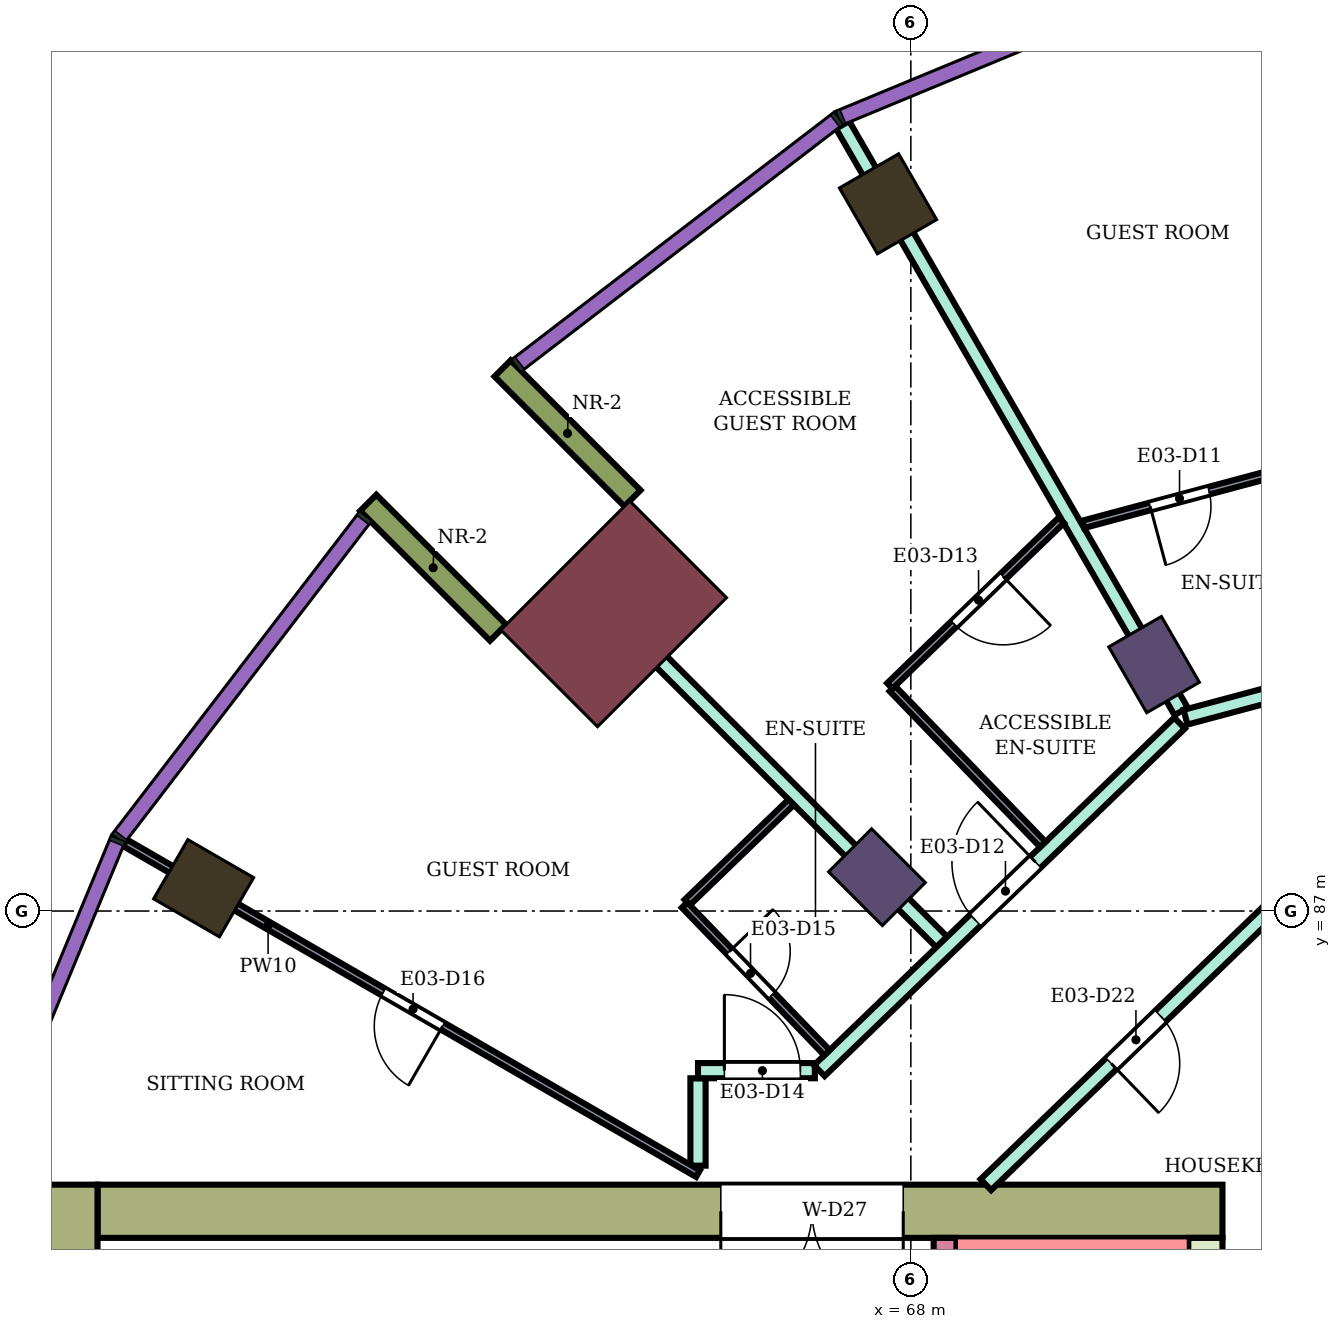
"""IFC4 building model, lengths in metres.
Left out: names, types, materials, properties, quantities, classifications, styles, units other than length and angle.
Written with IfcOpenShell. Run it as: python <this file> out.ifc"""

import sys

from ifc_helpers import new_model, si_unit, direction, frame, frame_2d, origin, origin_2d, place, context, subcontext, project, spatial, rectangle, extrude, element, fill, save


model = new_model("IFC4")
c1 = context("Model", 3, precision=1e-05, world=origin(), true_north=direction((0.0, 1.0)))
c2 = subcontext(c1, "Body", "Model", "MODEL_VIEW")
j1 = project(units=[si_unit("LENGTHUNIT", "METRE"), si_unit("PLANEANGLEUNIT", "RADIAN")], contexts=[c1])
p1 = place(None, origin())
s1 = spatial("IfcSite", under=j1, at=p1, CompositionType="ELEMENT")
p2 = place(p1, origin())
s2 = spatial("IfcBuilding", under=s1, at=p2, CompositionType="ELEMENT")
p3 = place(p2, frame((0.0, 0.0, 138.0)))
s3 = spatial("IfcBuildingStorey", under=s2, at=p3, CompositionType="ELEMENT", Elevation=138.0)
for number, where, z_axis, x_axis in (
    (1, (67.7, 96.304, 0.0), (0.0, 0.0, 1.0), (-0.5, 0.866, 0.0)),
    (2, (58.696, 87.3, 0.0), (0.0, 0.0, 1.0), (-0.866, 0.5, 0.0)),
):
    element("IfcColumn", number, at=place(p3, frame(where, z_axis=z_axis, x_axis=x_axis)), inside=s3, PredefinedType="COLUMN", context=c2, shape_type="SweptSolid", body=[
        extrude(rectangle(XDim=1.0, YDim=0.9, at=origin_2d()), origin(), (0.0, 0.0, 1.0), 3.9),
    ])
for number, where, z_axis, x_axis in (
    (3, (71.2, 90.242, 0.0), (0.0, 0.0, 1.0), (-0.5, 0.866, 0.0)),
    (4, (67.555, 87.445, 0.0), (0.0, 0.0, 1.0), (-0.707, 0.707, 0.0)),
):
    element("IfcColumn", number, at=place(p3, frame(where, z_axis=z_axis, x_axis=x_axis)), inside=s3, PredefinedType="COLUMN", context=c2, shape_type="SweptSolid", body=[
        extrude(rectangle(XDim=1.0, YDim=0.8, at=origin_2d()), origin(), (0.0, 0.0, 1.0), 3.9),
    ])
p4 = place(p3, frame((64.09, 90.91, 0.0), z_axis=(0.0, 0.0, 1.0), x_axis=(-0.707106781187, 0.707106781187, 0.0)))
e5 = element("IfcColumn", 5, at=p4, inside=s3, PredefinedType="COLUMN", context=c2, shape_type="SweptSolid", body=[
    extrude(rectangle(XDim=1.8, YDim=2.4, at=origin_2d()), origin(), (0.0, 0.0, 1.0), 3.9),
])
p5 = place(p3, frame((72.1, 83.05, 0.0), z_axis=(0.0, 0.0, 1.0), x_axis=(-1.0, 0.0, 0.0)))
e6 = element("IfcWall", 6, at=p5, inside=s3, PredefinedType="SHEAR", context=c2, shape_type="SweptSolid", body=[
    extrude(rectangle(XDim=14.8, YDim=0.7, at=frame_2d((7.4, 0.0))), origin(), (0.0, 0.0, 1.0), 3.58),
])
p6 = place(p5, frame((4.2, 0.0, 0.0)))
e7 = element("IfcOpeningElement", 7, at=p6, cuts=e6, PredefinedType="OPENING", context=c2, shape_type="SweptSolid", body=[
    extrude(rectangle(XDim=2.4, YDim=2.4, at=frame_2d((1.2, 1.2))), frame((0.0, 0.36, 0.0), z_axis=(0.0, -1.0, 0.0), x_axis=(1.0, 0.0, 0.0)), (0.0, 0.0, 1.0), 0.72),
])
p7 = place(p3, frame((71.875, 82.7, 0.0), z_axis=(0.0, 0.0, 1.0), x_axis=(0.0, -1.0, 0.0)))
e8 = element("IfcWall", 8, at=p7, inside=s3, PredefinedType="SHEAR", context=c2, shape_type="SweptSolid", body=[
    extrude(rectangle(XDim=7.7, YDim=0.45, at=frame_2d((3.85, 0.0))), origin(), (0.0, 0.0, 1.0), 3.58),
])
p8 = place(p3, frame((56.95, 83.4, 0.0), z_axis=(0.0, 0.0, 1.0), x_axis=(0.0, -1.0, 0.0)))
e9 = element("IfcWall", 9, at=p8, inside=s3, PredefinedType="SHEAR", context=c2, shape_type="SweptSolid", body=[
    extrude(rectangle(XDim=16.8, YDim=0.7, at=frame_2d((8.4, 0.0))), origin(), (0.0, 0.0, 1.0), 3.58),
])
p9 = place(p3, frame((68.45, 82.7, 0.0), z_axis=(0.0, 0.0, 1.0), x_axis=(0.0, -1.0, 0.0)))
e10 = element("IfcWall", 10, at=p9, inside=s3, PredefinedType="SHEAR", context=c2, shape_type="SweptSolid", body=[
    extrude(rectangle(XDim=7.7, YDim=0.3, at=frame_2d((3.85, 0.0))), origin(), (0.0, 0.0, 1.0), 3.58),
])
p10 = place(p9, frame((0.35, 0.0, 0.0)))
e11 = element("IfcOpeningElement", 11, at=p10, cuts=e10, PredefinedType="OPENING", context=c2, shape_type="SweptSolid", body=[
    extrude(rectangle(XDim=0.9, YDim=2.1, at=frame_2d((0.45, 1.05))), frame((0.0, 0.16, 0.0), z_axis=(0.0, -1.0, 0.0), x_axis=(1.0, 0.0, 0.0)), (0.0, 0.0, 1.0), 0.32),
])
for number, where, z_axis, x_axis in (
    (12, (64.338, 92.43, 0.0), (0.0, 0.0, 1.0), (-0.707, 0.707, 0.0)),
    (13, (62.57, 90.662, 0.0), (0.0, 0.0, 1.0), (-0.707, 0.707, 0.0)),
):
    element("IfcWall", number, at=place(p3, frame(where, z_axis=z_axis, x_axis=x_axis)), inside=s3, PredefinedType="NOTDEFINED", context=c2, shape_type="SweptSolid", body=[
        extrude(rectangle(XDim=2.416, YDim=0.3, at=frame_2d((1.208, 0.0))), origin(), (0.0, 0.0, 1.0), 3.9),
    ])
p11 = place(p3, frame((63.596, 91.406, 0.0), z_axis=(0.0, 0.0, 1.0), x_axis=(0.706963264491, -0.707250268759, 0.0)))
e14 = element("IfcWall", 14, at=p11, inside=s3, PredefinedType="PARTITIONING", context=c2, shape_type="SweptSolid", body=[
    extrude(rectangle(XDim=6.805, YDim=0.2, at=frame_2d((3.403, 0.0))), origin(), (0.0, 0.0, 1.0), 3.45),
])
p12 = place(p3, frame((65.2, 83.65, 0.0), z_axis=(0.0, 0.0, 1.0), x_axis=(0.0, 1.0, 0.0)))
e15 = element("IfcWall", 15, at=p12, inside=s3, PredefinedType="PARTITIONING", context=c2, shape_type="SweptSolid", body=[
    extrude(rectangle(XDim=1.15, YDim=0.2, at=frame_2d((0.575, 0.0))), origin(), (0.0, 0.0, 1.0), 3.45),
])
p13 = place(p3, frame((65.2, 84.9, 0.0), z_axis=(0.0, 0.0, 1.0), x_axis=(1.0, 0.0, 0.0)))
e16 = element("IfcWall", 16, at=p13, inside=s3, PredefinedType="PARTITIONING", context=c2, shape_type="SweptSolid", body=[
    extrude(rectangle(XDim=1.537, YDim=0.2, at=frame_2d((0.769, 0.0))), origin(), (0.0, 0.0, 1.0), 3.45),
])
p14 = place(p13, frame((0.347, 0.0, 0.0)))
e17 = element("IfcOpeningElement", 17, at=p14, cuts=e16, PredefinedType="OPENING", context=c2, shape_type="SweptSolid", body=[
    extrude(rectangle(XDim=1.0, YDim=2.1, at=frame_2d((0.5, 1.05))), frame((0.0, 0.11, 0.0), z_axis=(0.0, -1.0, 0.0), x_axis=(1.0, 0.0, 0.0)), (0.0, 0.0, 1.0), 0.22),
])
p15 = place(p3, frame((66.797, 84.9, 0.0), z_axis=(0.0, 0.0, 1.0), x_axis=(0.719692092412, 0.694293376116, 0.0)))
e18 = element("IfcWall", 18, at=p15, inside=s3, PredefinedType="PARTITIONING", context=c2, shape_type="SweptSolid", body=[
    extrude(rectangle(XDim=6.584, YDim=0.2, at=frame_2d((3.292, 0.0))), origin(), (0.0, 0.0, 1.0), 3.45),
])
p16 = place(p15, frame((2.852, 0.0, 0.0)))
e19 = element("IfcOpeningElement", 19, at=p16, cuts=e18, PredefinedType="OPENING", context=c2, shape_type="SweptSolid", body=[
    extrude(rectangle(XDim=1.1, YDim=2.1, at=frame_2d((0.55, 1.05))), frame((0.0, 0.11, 0.0), z_axis=(0.0, -1.0, 0.0), x_axis=(1.0, 0.0, 0.0)), (0.0, 0.0, 1.0), 0.22),
])
p17 = place(p3, frame((67.103, 97.342, 0.0), z_axis=(0.0, 0.0, 1.0), x_axis=(0.499900389553, -0.866082906265, 0.0)))
e20 = element("IfcWall", 20, at=p17, inside=s3, PredefinedType="PARTITIONING", context=c2, shape_type="SweptSolid", body=[
    extrude(rectangle(XDim=8.908, YDim=0.2, at=frame_2d((4.454, 0.0))), origin(), (0.0, 0.0, 1.0), 3.45),
])
p18 = place(p3, frame((68.987, 83.4, 0.0), z_axis=(0.0, 0.0, 1.0), x_axis=(0.719547721855, 0.694442996922, 0.0)))
e21 = element("IfcWall", 21, at=p18, inside=s3, PredefinedType="PARTITIONING", context=c2, shape_type="SweptSolid", body=[
    extrude(rectangle(XDim=5.378, YDim=0.2, at=frame_2d((2.689, 0.0))), origin(), (0.0, 0.0, 1.0), 3.45),
])
p19 = place(p18, frame((2.294, 0.0, 0.0)))
e22 = element("IfcOpeningElement", 22, at=p19, cuts=e21, PredefinedType="OPENING", context=c2, shape_type="SweptSolid", body=[
    extrude(rectangle(XDim=0.9, YDim=2.1, at=frame_2d((0.45, 1.05))), frame((0.0, 0.11, 0.0), z_axis=(0.0, -1.0, 0.0), x_axis=(1.0, 0.0, 0.0)), (0.0, 0.0, 1.0), 0.22),
])
p20 = place(p3, frame((71.614, 89.55, 0.0), z_axis=(0.0, 0.0, 1.0), x_axis=(0.965982156828, 0.258608725086, 0.0)))
e23 = element("IfcWall", 23, at=p20, inside=s3, PredefinedType="PARTITIONING", context=c2, shape_type="SweptSolid", body=[
    extrude(rectangle(XDim=8.592, YDim=0.2, at=frame_2d((4.296, 0.0))), origin(), (0.0, 0.0, 1.0), 3.45),
])
p21 = place(p20, frame((4.865, 0.0, 0.0)))
e24 = element("IfcOpeningElement", 24, at=p21, cuts=e23, PredefinedType="OPENING", context=c2, shape_type="SweptSolid", body=[
    extrude(rectangle(XDim=1.0, YDim=2.1, at=frame_2d((0.5, 1.05))), frame((0.0, 0.11, 0.0), z_axis=(0.0, -1.0, 0.0), x_axis=(1.0, 0.0, 0.0)), (0.0, 0.0, 1.0), 0.22),
])
p22 = place(p20, frame((2.804, 0.0, 0.0)))
e25 = element("IfcOpeningElement", 25, at=p22, cuts=e23, PredefinedType="OPENING", context=c2, shape_type="SweptSolid", body=[
    extrude(rectangle(XDim=1.0, YDim=2.1, at=frame_2d((0.5, 1.05))), frame((0.0, 0.11, 0.0), z_axis=(0.0, -1.0, 0.0), x_axis=(1.0, 0.0, 0.0)), (0.0, 0.0, 1.0), 0.22),
])
p23 = place(p3, frame((57.659, 87.899, 0.0), z_axis=(0.0, 0.0, 1.0), x_axis=(0.86602264145, -0.500004784474, 0.0)))
e26 = element("IfcWall", 26, at=p23, inside=s3, PredefinedType="PARTITIONING", context=c2, shape_type="SweptSolid", body=[
    extrude(rectangle(XDim=8.708, YDim=0.1, at=frame_2d((4.354, 0.0))), origin(), (0.0, 0.0, 1.0), 3.45),
])
p24 = place(p23, frame((3.929, 0.0, 0.0)))
e27 = element("IfcOpeningElement", 27, at=p24, cuts=e26, PredefinedType="OPENING", context=c2, shape_type="SweptSolid", body=[
    extrude(rectangle(XDim=0.9, YDim=2.1, at=frame_2d((0.45, 1.05))), frame((0.0, 0.06, 0.0), z_axis=(0.0, -1.0, 0.0), x_axis=(1.0, 0.0, 0.0)), (0.0, 0.0, 1.0), 0.12),
])
p25 = place(p3, frame((65.059, 87.114, 0.0), z_axis=(0.0, 0.0, 1.0), x_axis=(0.719653890619, 0.694332973232, 0.0)))
e28 = element("IfcWall", 28, at=p25, inside=s3, PredefinedType="PARTITIONING", context=c2, shape_type="SweptSolid", body=[
    extrude(rectangle(XDim=1.899, YDim=0.1, at=frame_2d((0.95, 0.0))), origin(), (0.0, 0.0, 1.0), 3.45),
])
p26 = place(p3, frame((65.023, 87.079, 0.0), z_axis=(0.0, 0.0, 1.0), x_axis=(0.694287838235, -0.719697434815, 0.0)))
e29 = element("IfcWall", 29, at=p26, inside=s3, PredefinedType="PARTITIONING", context=c2, shape_type="SweptSolid", body=[
    extrude(rectangle(XDim=2.7, YDim=0.1, at=frame_2d((1.35, 0.0))), origin(), (0.0, 0.0, 1.0), 3.45),
])
p27 = place(p26, frame((0.85, 0.0, 0.0)))
e30 = element("IfcOpeningElement", 30, at=p27, cuts=e29, PredefinedType="OPENING", context=c2, shape_type="SweptSolid", body=[
    extrude(rectangle(XDim=0.8, YDim=2.1, at=frame_2d((0.4, 1.05))), frame((0.0, 0.06, 0.0), z_axis=(0.0, -1.0, 0.0), x_axis=(1.0, 0.0, 0.0)), (0.0, 0.0, 1.0), 0.12),
])
p28 = place(p3, frame((67.758, 89.926, 0.0), z_axis=(0.0, 0.0, 1.0), x_axis=(0.694485934895, -0.719506279495, 0.0)))
e31 = element("IfcWall", 31, at=p28, inside=s3, PredefinedType="PARTITIONING", context=c2, shape_type="SweptSolid", body=[
    extrude(rectangle(XDim=2.849, YDim=0.1, at=frame_2d((1.425, 0.0))), origin(), (0.0, 0.0, 1.0), 3.45),
])
p29 = place(p3, frame((67.723, 89.962, 0.0), z_axis=(0.0, 0.0, 1.0), x_axis=(0.719487277563, 0.694505620873, 0.0)))
e32 = element("IfcWall", 32, at=p29, inside=s3, PredefinedType="PARTITIONING", context=c2, shape_type="SweptSolid", body=[
    extrude(rectangle(XDim=3.137, YDim=0.1, at=frame_2d((1.568, 0.0))), origin(), (0.0, 0.0, 1.0), 3.45),
])
p30 = place(p29, frame((1.173, 0.0, 0.0)))
e33 = element("IfcOpeningElement", 33, at=p30, cuts=e32, PredefinedType="OPENING", context=c2, shape_type="SweptSolid", body=[
    extrude(rectangle(XDim=0.9, YDim=2.1, at=frame_2d((0.45, 1.05))), frame((0.0, 0.06, 0.0), z_axis=(0.0, -1.0, 0.0), x_axis=(1.0, 0.0, 0.0)), (0.0, 0.0, 1.0), 0.12),
])
p31 = place(p3, frame((70.268, 92.087, 0.0), z_axis=(0.0, 0.0, 1.0), x_axis=(0.965937937835, 0.258773839966, 0.0)))
e34 = element("IfcWall", 34, at=p31, inside=s3, PredefinedType="PARTITIONING", context=c2, shape_type="SweptSolid", body=[
    extrude(rectangle(XDim=2.694, YDim=0.1, at=frame_2d((1.347, 0.0))), origin(), (0.0, 0.0, 1.0), 3.45),
])
p32 = place(p31, frame((0.912, 0.0, 0.0)))
e35 = element("IfcOpeningElement", 35, at=p32, cuts=e34, PredefinedType="OPENING", context=c2, shape_type="SweptSolid", body=[
    extrude(rectangle(XDim=0.8, YDim=2.1, at=frame_2d((0.4, 1.05))), frame((0.0, 0.06, 0.0), z_axis=(0.0, -1.0, 0.0), x_axis=(1.0, 0.0, 0.0)), (0.0, 0.0, 1.0), 0.12),
])
p33 = place(p32, frame((0.8, 0.0, 0.0), z_axis=(0.0, 0.0, 1.0), x_axis=(-1.0, 0.0, 0.0)))
e36 = element("IfcDoor", 36, at=p33, inside=s3, OperationType="SINGLE_SWING_RIGHT", PredefinedType="DOOR", context=c2, shape_type="SweptSolid", body=[
    extrude(rectangle(XDim=0.8, YDim=2.1, at=frame_2d((0.4, 1.05))), frame((0.0, 0.025, 0.0), z_axis=(0.0, -1.0, 0.0), x_axis=(1.0, 0.0, 0.0)), (0.0, 0.0, 1.0), 0.05),
])
fill(e35, e36)
p34 = place(p16, origin())
e37 = element("IfcDoor", 37, at=p34, inside=s3, OperationType="SINGLE_SWING_RIGHT", PredefinedType="DOOR", context=c2, shape_type="SweptSolid", body=[
    extrude(rectangle(XDim=1.1, YDim=2.1, at=frame_2d((0.55, 1.05))), frame((0.0, 0.025, 0.0), z_axis=(0.0, -1.0, 0.0), x_axis=(1.0, 0.0, 0.0)), (0.0, 0.0, 1.0), 0.05),
])
fill(e19, e37)
p35 = place(p30, frame((0.9, 0.0, 0.0), z_axis=(0.0, 0.0, 1.0), x_axis=(-1.0, 0.0, 0.0)))
e38 = element("IfcDoor", 38, at=p35, inside=s3, OperationType="SINGLE_SWING_LEFT", PredefinedType="DOOR", context=c2, shape_type="SweptSolid", body=[
    extrude(rectangle(XDim=0.9, YDim=2.1, at=frame_2d((0.45, 1.05))), frame((0.0, 0.025, 0.0), z_axis=(0.0, -1.0, 0.0), x_axis=(1.0, 0.0, 0.0)), (0.0, 0.0, 1.0), 0.05),
])
fill(e33, e38)
p36 = place(p14, origin())
e39 = element("IfcDoor", 39, at=p36, inside=s3, OperationType="SINGLE_SWING_LEFT", PredefinedType="DOOR", context=c2, shape_type="SweptSolid", body=[
    extrude(rectangle(XDim=1.0, YDim=2.1, at=frame_2d((0.5, 1.05))), frame((0.0, 0.025, 0.0), z_axis=(0.0, -1.0, 0.0), x_axis=(1.0, 0.0, 0.0)), (0.0, 0.0, 1.0), 0.05),
])
fill(e17, e39)
p37 = place(p27, origin())
e40 = element("IfcDoor", 40, at=p37, inside=s3, OperationType="SINGLE_SWING_LEFT", PredefinedType="DOOR", context=c2, shape_type="SweptSolid", body=[
    extrude(rectangle(XDim=0.8, YDim=2.1, at=frame_2d((0.4, 1.05))), frame((0.0, 0.025, 0.0), z_axis=(0.0, -1.0, 0.0), x_axis=(1.0, 0.0, 0.0)), (0.0, 0.0, 1.0), 0.05),
])
fill(e30, e40)
p38 = place(p24, frame((0.9, 0.0, 0.0), z_axis=(0.0, 0.0, 1.0), x_axis=(-1.0, 0.0, 0.0)))
e41 = element("IfcDoor", 41, at=p38, inside=s3, OperationType="SINGLE_SWING_LEFT", PredefinedType="DOOR", context=c2, shape_type="SweptSolid", body=[
    extrude(rectangle(XDim=0.9, YDim=2.1, at=frame_2d((0.45, 1.05))), frame((0.0, 0.025, 0.0), z_axis=(0.0, -1.0, 0.0), x_axis=(1.0, 0.0, 0.0)), (0.0, 0.0, 1.0), 0.05),
])
fill(e27, e41)
p39 = place(p19, frame((0.9, 0.0, 0.0), z_axis=(0.0, 0.0, 1.0), x_axis=(-1.0, 0.0, 0.0)))
e42 = element("IfcDoor", 42, at=p39, inside=s3, OperationType="SINGLE_SWING_RIGHT", PredefinedType="DOOR", context=c2, shape_type="SweptSolid", body=[
    extrude(rectangle(XDim=0.9, YDim=2.1, at=frame_2d((0.45, 1.05))), frame((0.0, 0.025, 0.0), z_axis=(0.0, -1.0, 0.0), x_axis=(1.0, 0.0, 0.0)), (0.0, 0.0, 1.0), 0.05),
])
fill(e22, e42)
p40 = place(p6, origin())
e43 = element("IfcDoor", 43, at=p40, inside=s3, OperationType="DOUBLE_DOOR_SINGLE_SWING", PredefinedType="DOOR", context=c2, shape_type="SweptSolid", body=[
    extrude(rectangle(XDim=2.4, YDim=2.4, at=frame_2d((1.2, 1.2))), frame((0.0, 0.025, 0.0), z_axis=(0.0, -1.0, 0.0), x_axis=(1.0, 0.0, 0.0)), (0.0, 0.0, 1.0), 0.05),
])
fill(e7, e43)
save(model, sys.argv[1])
